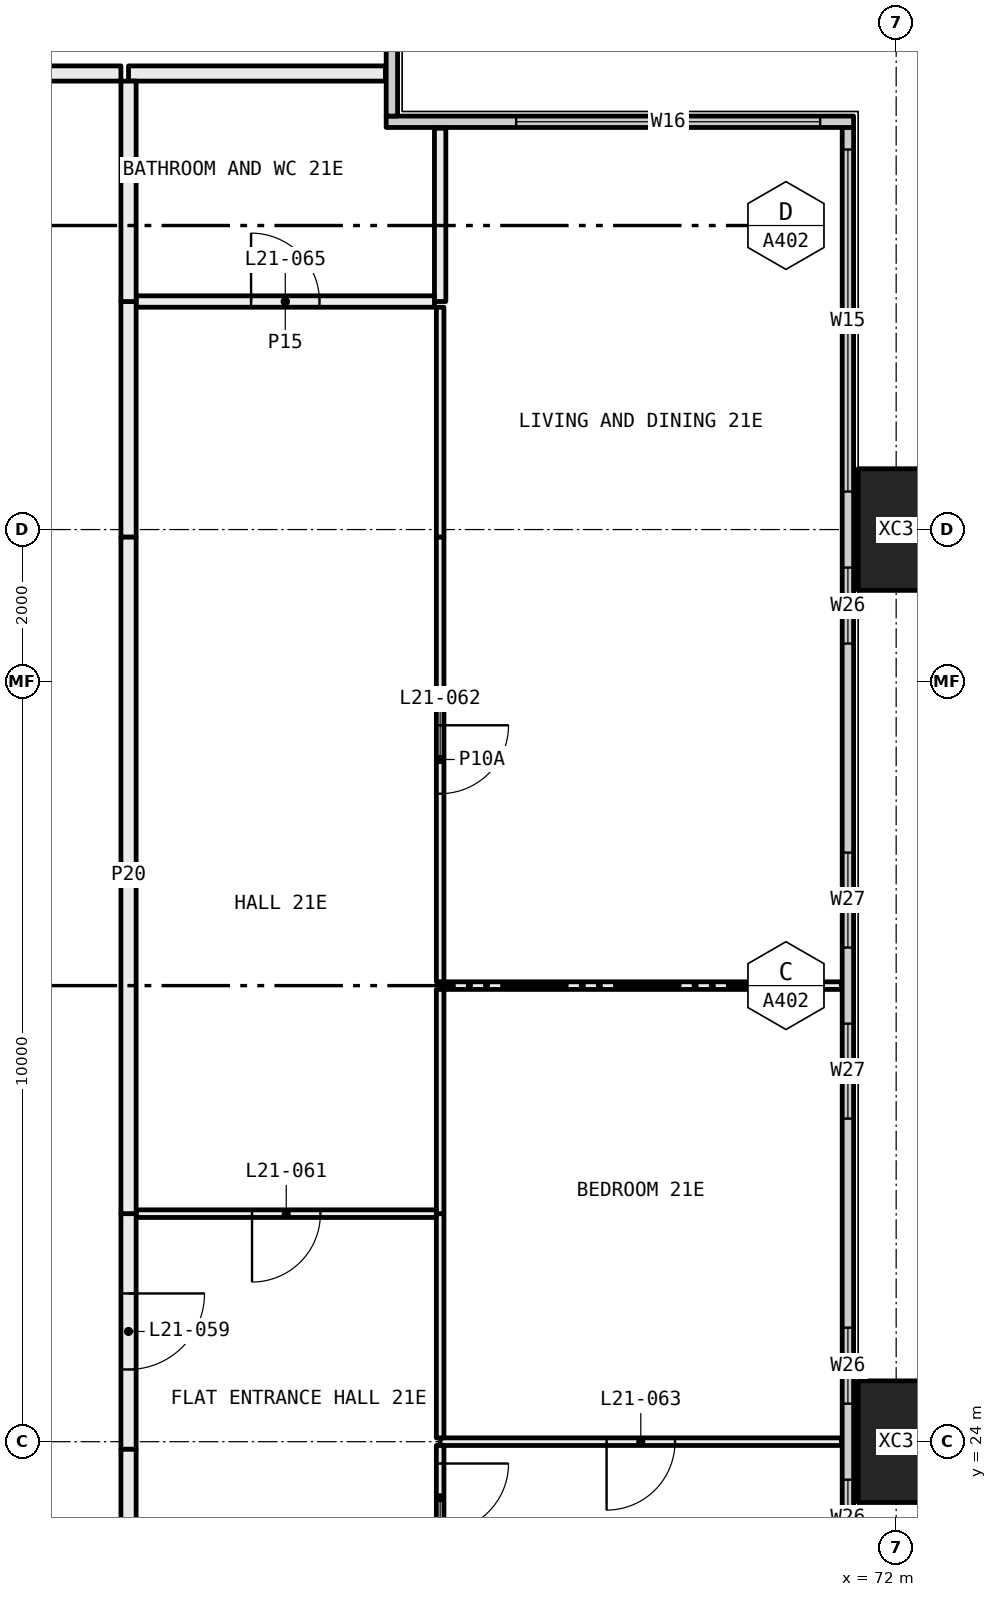
"""IFC4 building model, lengths in metres.
Left out: names, types, materials, properties, quantities, classifications, styles, units other than length and angle.
Written with IfcOpenShell. Run it as: python <this file> out.ifc"""

import sys

from ifc_helpers import new_model, si_unit, direction, frame, frame_2d, origin, origin_2d, place, context, subcontext, project, spatial, rectangle, hollow_rectangle, extrude, element, fill, save


model = new_model("IFC4")
c1 = context("Model", 3, precision=1e-05, world=origin(), true_north=direction((0.0, 1.0)))
c2 = subcontext(c1, "Body", "Model", "MODEL_VIEW")
j1 = project(units=[si_unit("LENGTHUNIT", "METRE"), si_unit("PLANEANGLEUNIT", "RADIAN")], contexts=[c1])
p1 = place(None, origin())
s1 = spatial("IfcSite", under=j1, at=p1, CompositionType="ELEMENT")
p2 = place(p1, origin())
s2 = spatial("IfcBuilding", under=s1, at=p2, CompositionType="ELEMENT")
p3 = place(p2, frame((0.0, 0.0, 85.2)))
s3 = spatial("IfcBuildingStorey", under=s2, at=p3, CompositionType="ELEMENT", Elevation=85.2)
for number, where, z_axis, x_axis in (
    (1, (72.0, 24.0, -0.4), (0.0, 0.0, 1.0), (0.0, 1.0, 0.0)),
    (2, (72.0, 36.0, -0.4), (0.0, 0.0, 1.0), (0.0, 1.0, 0.0)),
):
    element("IfcColumn", number, at=place(p3, frame(where, z_axis=z_axis, x_axis=x_axis)), inside=s3, PredefinedType="COLUMN", context=c2, shape_type="SweptSolid", body=[
        extrude(hollow_rectangle(XDim=1.6, YDim=1.0, WallThickness=0.065, at=origin_2d()), origin(), (0.0, 0.0, 1.0), 3.45),
    ])
p4 = place(p3, frame((71.365, 6.71, 0.0), z_axis=(0.0, 0.0, 1.0), x_axis=(0.0, 1.0, 0.0)))
e3 = element("IfcWall", 3, at=p4, inside=s3, PredefinedType="ELEMENTEDWALL", context=c2, shape_type="SweptSolid", body=[
    extrude(rectangle(XDim=34.58, YDim=0.15, at=frame_2d((17.29, 0.0))), origin(), (0.0, 0.0, 1.0), 3.05),
])
p5 = place(p4, frame((0.29, 0.0, 0.45)))
e4 = element("IfcOpeningElement", 4, at=p5, cuts=e3, PredefinedType="OPENING", context=c2, shape_type="SweptSolid", body=[
    extrude(rectangle(XDim=4.5, YDim=2.55, at=frame_2d((2.25, 1.275))), frame((0.0, 0.085, 0.0), z_axis=(0.0, -1.0, 0.0), x_axis=(1.0, 0.0, 0.0)), (0.0, 0.0, 1.0), 0.17),
])
p6 = place(p4, frame((5.79, 0.0, 0.45)))
e5 = element("IfcOpeningElement", 5, at=p6, cuts=e3, PredefinedType="OPENING", context=c2, shape_type="SweptSolid", body=[
    extrude(rectangle(XDim=1.0, YDim=2.55, at=frame_2d((0.5, 1.275))), frame((0.0, 0.085, 0.0), z_axis=(0.0, -1.0, 0.0), x_axis=(1.0, 0.0, 0.0)), (0.0, 0.0, 1.0), 0.17),
])
p7 = place(p4, frame((9.54, 0.0, 0.45)))
e6 = element("IfcOpeningElement", 6, at=p7, cuts=e3, PredefinedType="OPENING", context=c2, shape_type="SweptSolid", body=[
    extrude(rectangle(XDim=1.25, YDim=2.55, at=frame_2d((0.625, 1.275))), frame((0.0, 0.085, 0.0), z_axis=(0.0, -1.0, 0.0), x_axis=(1.0, 0.0, 0.0)), (0.0, 0.0, 1.0), 0.17),
])
p8 = place(p4, frame((11.79, 0.0, 0.45)))
e7 = element("IfcOpeningElement", 7, at=p8, cuts=e3, PredefinedType="OPENING", context=c2, shape_type="SweptSolid", body=[
    extrude(rectangle(XDim=1.25, YDim=2.55, at=frame_2d((0.625, 1.275))), frame((0.0, 0.085, 0.0), z_axis=(0.0, -1.0, 0.0), x_axis=(1.0, 0.0, 0.0)), (0.0, 0.0, 1.0), 0.17),
])
p9 = place(p4, frame((15.79, 0.0, 0.45)))
e8 = element("IfcOpeningElement", 8, at=p9, cuts=e3, PredefinedType="OPENING", context=c2, shape_type="SweptSolid", body=[
    extrude(rectangle(XDim=1.0, YDim=2.55, at=frame_2d((0.5, 1.275))), frame((0.0, 0.085, 0.0), z_axis=(0.0, -1.0, 0.0), x_axis=(1.0, 0.0, 0.0)), (0.0, 0.0, 1.0), 0.17),
])
p10 = place(p4, frame((17.79, 0.0, 0.45)))
e9 = element("IfcOpeningElement", 9, at=p10, cuts=e3, PredefinedType="OPENING", context=c2, shape_type="SweptSolid", body=[
    extrude(rectangle(XDim=1.0, YDim=2.55, at=frame_2d((0.5, 1.275))), frame((0.0, 0.085, 0.0), z_axis=(0.0, -1.0, 0.0), x_axis=(1.0, 0.0, 0.0)), (0.0, 0.0, 1.0), 0.17),
])
p11 = place(p4, frame((21.54, 0.0, 0.45)))
e10 = element("IfcOpeningElement", 10, at=p11, cuts=e3, PredefinedType="OPENING", context=c2, shape_type="SweptSolid", body=[
    extrude(rectangle(XDim=1.25, YDim=2.55, at=frame_2d((0.625, 1.275))), frame((0.0, 0.085, 0.0), z_axis=(0.0, -1.0, 0.0), x_axis=(1.0, 0.0, 0.0)), (0.0, 0.0, 1.0), 0.17),
])
p12 = place(p4, frame((23.79, 0.0, 0.45)))
e11 = element("IfcOpeningElement", 11, at=p12, cuts=e3, PredefinedType="OPENING", context=c2, shape_type="SweptSolid", body=[
    extrude(rectangle(XDim=1.25, YDim=2.55, at=frame_2d((0.625, 1.275))), frame((0.0, 0.085, 0.0), z_axis=(0.0, -1.0, 0.0), x_axis=(1.0, 0.0, 0.0)), (0.0, 0.0, 1.0), 0.17),
])
p13 = place(p4, frame((27.79, 0.0, 0.45)))
e12 = element("IfcOpeningElement", 12, at=p13, cuts=e3, PredefinedType="OPENING", context=c2, shape_type="SweptSolid", body=[
    extrude(rectangle(XDim=1.0, YDim=2.55, at=frame_2d((0.5, 1.275))), frame((0.0, 0.085, 0.0), z_axis=(0.0, -1.0, 0.0), x_axis=(1.0, 0.0, 0.0)), (0.0, 0.0, 1.0), 0.17),
])
p14 = place(p4, frame((29.79, 0.0, 0.45)))
e13 = element("IfcOpeningElement", 13, at=p14, cuts=e3, PredefinedType="OPENING", context=c2, shape_type="SweptSolid", body=[
    extrude(rectangle(XDim=4.5, YDim=2.55, at=frame_2d((2.25, 1.275))), frame((0.0, 0.085, 0.0), z_axis=(0.0, -1.0, 0.0), x_axis=(1.0, 0.0, 0.0)), (0.0, 0.0, 1.0), 0.17),
])
p15 = place(p3, frame((65.29, 41.365, 0.0), z_axis=(0.0, 0.0, 1.0), x_axis=(1.0, 0.0, 0.0)))
e14 = element("IfcWall", 14, at=p15, inside=s3, PredefinedType="ELEMENTEDWALL", context=c2, shape_type="SweptSolid", body=[
    extrude(rectangle(XDim=6.15, YDim=0.15, at=frame_2d((3.075, 0.0))), origin(), (0.0, 0.0, 1.0), 3.05),
])
p16 = place(p15, frame((1.71, 0.0, 0.45)))
e15 = element("IfcOpeningElement", 15, at=p16, cuts=e14, PredefinedType="OPENING", context=c2, shape_type="SweptSolid", body=[
    extrude(rectangle(XDim=4.0, YDim=2.55, at=frame_2d((2.0, 1.275))), frame((0.0, 0.085, 0.0), z_axis=(0.0, -1.0, 0.0), x_axis=(1.0, 0.0, 0.0)), (0.0, 0.0, 1.0), 0.17),
])
p17 = place(p3, frame((65.365, 41.44, 0.0), z_axis=(0.0, 0.0, 1.0), x_axis=(0.0, 1.0, 0.0)))
e16 = element("IfcWall", 16, at=p17, inside=s3, PredefinedType="ELEMENTEDWALL", context=c2, shape_type="SweptSolid", body=[
    extrude(rectangle(XDim=5.85, YDim=0.15, at=frame_2d((2.925, 0.0))), origin(), (0.0, 0.0, 1.0), 3.05),
])
p18 = place(p17, frame((1.56, 0.0, 0.45)))
e17 = element("IfcOpeningElement", 17, at=p18, cuts=e16, PredefinedType="OPENING", context=c2, shape_type="SweptSolid", body=[
    extrude(rectangle(XDim=4.0, YDim=2.55, at=frame_2d((2.0, 1.275))), frame((0.0, 0.085, 0.0), z_axis=(0.0, -1.0, 0.0), x_axis=(1.0, 0.0, 0.0)), (0.0, 0.0, 1.0), 0.17),
])
p19 = place(p3, frame((71.28, 24.0, 0.0), z_axis=(0.0, 0.0, 1.0), x_axis=(-1.0, 0.0, 0.0)))
e18 = element("IfcWall", 18, at=p19, inside=s3, PredefinedType="PARTITIONING", context=c2, shape_type="SweptSolid", body=[
    extrude(rectangle(XDim=5.28, YDim=0.1, at=frame_2d((2.64, 0.0))), origin(), (0.0, 0.0, 1.0), 2.45),
])
p20 = place(p19, frame((2.19, 0.0, 0.0)))
e19 = element("IfcOpeningElement", 19, at=p20, cuts=e18, PredefinedType="OPENING", context=c2, shape_type="SweptSolid", body=[
    extrude(rectangle(XDim=0.9, YDim=2.1, at=frame_2d((0.45, 1.05))), frame((0.0, 0.06, 0.0), z_axis=(0.0, -1.0, 0.0), x_axis=(1.0, 0.0, 0.0)), (0.0, 0.0, 1.0), 0.12),
])
p21 = place(p3, frame((66.0, 23.95, 0.0), z_axis=(0.0, 0.0, 1.0), x_axis=(0.0, -1.0, 0.0)))
e20 = element("IfcWall", 20, at=p21, inside=s3, PredefinedType="PARTITIONING", context=c2, shape_type="SweptSolid", body=[
    extrude(rectangle(XDim=1.375, YDim=0.1, at=frame_2d((0.688, 0.0))), origin(), (0.0, 0.0, 1.0), 2.45),
])
p22 = place(p21, frame((0.238, 0.0, 0.0)))
e21 = element("IfcOpeningElement", 21, at=p22, cuts=e20, PredefinedType="OPENING", context=c2, shape_type="SweptSolid", body=[
    extrude(rectangle(XDim=0.9, YDim=2.1, at=frame_2d((0.45, 1.05))), frame((0.0, 0.06, 0.0), z_axis=(0.0, -1.0, 0.0), x_axis=(1.0, 0.0, 0.0)), (0.0, 0.0, 1.0), 0.12),
])
p23 = place(p3, frame((71.28, 30.0, 0.0), z_axis=(0.0, 0.0, 1.0), x_axis=(-1.0, 0.0, 0.0)))
e22 = element("IfcWall", 22, at=p23, inside=s3, PredefinedType="PARTITIONING", context=c2, shape_type="SweptSolid", body=[
    extrude(rectangle(XDim=5.28, YDim=0.1, at=frame_2d((2.64, 0.0))), origin(), (0.0, 0.0, 1.0), 3.05),
])
p24 = place(p3, frame((66.0, 27.0, 0.0), z_axis=(0.0, 0.0, 1.0), x_axis=(0.0, -1.0, 0.0)))
e23 = element("IfcWall", 23, at=p24, inside=s3, PredefinedType="PARTITIONING", context=c2, shape_type="SweptSolid", body=[
    extrude(rectangle(XDim=2.95, YDim=0.1, at=frame_2d((1.475, 0.0))), origin(), (0.0, 0.0, 1.0), 2.45),
])
p25 = place(p3, frame((66.0, 29.95, 0.0), z_axis=(0.0, 0.0, 1.0), x_axis=(0.0, -1.0, 0.0)))
e24 = element("IfcWall", 24, at=p25, inside=s3, PredefinedType="PARTITIONING", context=c2, shape_type="SweptSolid", body=[
    extrude(rectangle(XDim=2.95, YDim=0.1, at=frame_2d((1.475, 0.0))), origin(), (0.0, 0.0, 1.0), 3.05),
])
p26 = place(p3, frame((66.0, 38.925, 0.0), z_axis=(0.0, 0.0, 1.0), x_axis=(0.0, -1.0, 0.0)))
e25 = element("IfcWall", 25, at=p26, inside=s3, PredefinedType="PARTITIONING", context=c2, shape_type="SweptSolid", body=[
    extrude(rectangle(XDim=3.025, YDim=0.1, at=frame_2d((1.513, 0.0))), origin(), (0.0, 0.0, 1.0), 2.45),
])
p27 = place(p3, frame((66.0, 35.9, 0.0), z_axis=(0.0, 0.0, 1.0), x_axis=(0.0, -1.0, 0.0)))
e26 = element("IfcWall", 26, at=p27, inside=s3, PredefinedType="PARTITIONING", context=c2, shape_type="SweptSolid", body=[
    extrude(rectangle(XDim=5.85, YDim=0.1, at=frame_2d((2.925, 0.0))), origin(), (0.0, 0.0, 1.0), 3.05),
])
p28 = place(p27, frame((2.475, 0.0, 0.0)))
e27 = element("IfcOpeningElement", 27, at=p28, cuts=e26, PredefinedType="OPENING", context=c2, shape_type="SweptSolid", body=[
    extrude(rectangle(XDim=0.9, YDim=2.1, at=frame_2d((0.45, 1.05))), frame((0.0, 0.06, 0.0), z_axis=(0.0, -1.0, 0.0), x_axis=(1.0, 0.0, 0.0)), (0.0, 0.0, 1.0), 0.12),
])
p29 = place(p3, frame((66.0, 41.28, 0.0), z_axis=(0.0, 0.0, 1.0), x_axis=(0.0, -1.0, 0.0)))
e28 = element("IfcWall", 28, at=p29, inside=s3, PredefinedType="PARTITIONING", context=c2, shape_type="SweptSolid", body=[
    extrude(rectangle(XDim=2.28, YDim=0.15, at=frame_2d((1.14, 0.0))), origin(), (0.0, 0.0, 1.0), 3.05),
])
p30 = place(p3, frame((65.95, 27.0, 0.0), z_axis=(0.0, 0.0, 1.0), x_axis=(-1.0, 0.0, 0.0)))
e29 = element("IfcWall", 29, at=p30, inside=s3, PredefinedType="PARTITIONING", context=c2, shape_type="SweptSolid", body=[
    extrude(rectangle(XDim=3.95, YDim=0.1, at=frame_2d((1.975, 0.0))), origin(), (0.0, 0.0, 1.0), 3.05),
])
p31 = place(p30, frame((1.525, 0.0, 0.0)))
e30 = element("IfcOpeningElement", 30, at=p31, cuts=e29, PredefinedType="OPENING", context=c2, shape_type="SweptSolid", body=[
    extrude(rectangle(XDim=0.9, YDim=2.1, at=frame_2d((0.45, 1.05))), frame((0.0, 0.06, 0.0), z_axis=(0.0, -1.0, 0.0), x_axis=(1.0, 0.0, 0.0)), (0.0, 0.0, 1.0), 0.12),
])
p32 = place(p3, frame((61.9, 27.0, 0.0), z_axis=(0.0, 0.0, 1.0), x_axis=(0.0, -1.0, 0.0)))
e31 = element("IfcWall", 31, at=p32, inside=s3, PredefinedType="PARTITIONING", context=c2, shape_type="SweptSolid", body=[
    extrude(rectangle(XDim=3.1, YDim=0.2, at=frame_2d((1.55, 0.0))), origin(), (0.0, 0.0, 1.0), 2.45),
])
p33 = place(p32, frame((1.05, 0.0, 0.0)))
e32 = element("IfcOpeningElement", 32, at=p33, cuts=e31, PredefinedType="OPENING", context=c2, shape_type="SweptSolid", body=[
    extrude(rectangle(XDim=1.0, YDim=2.1, at=frame_2d((0.5, 1.05))), frame((0.0, 0.11, 0.0), z_axis=(0.0, -1.0, 0.0), x_axis=(1.0, 0.0, 0.0)), (0.0, 0.0, 1.0), 0.22),
])
p34 = place(p3, frame((61.9, 23.9, 0.0), z_axis=(0.0, 0.0, 1.0), x_axis=(0.0, -1.0, 0.0)))
e33 = element("IfcWall", 33, at=p34, inside=s3, PredefinedType="PARTITIONING", context=c2, shape_type="SweptSolid", body=[
    extrude(rectangle(XDim=1.4, YDim=0.2, at=frame_2d((0.7, 0.0))), origin(), (0.0, 0.0, 1.0), 3.05),
])
p35 = place(p3, frame((65.925, 39.0, 0.0), z_axis=(0.0, 0.0, 1.0), x_axis=(-1.0, 0.0, 0.0)))
e34 = element("IfcWall", 34, at=p35, inside=s3, PredefinedType="PARTITIONING", context=c2, shape_type="SweptSolid", body=[
    extrude(rectangle(XDim=3.925, YDim=0.15, at=frame_2d((1.962, 0.0))), origin(), (0.0, 0.0, 1.0), 3.05),
])
p36 = place(p35, frame((1.512, 0.0, 0.0)))
e35 = element("IfcOpeningElement", 35, at=p36, cuts=e34, PredefinedType="OPENING", context=c2, shape_type="SweptSolid", body=[
    extrude(rectangle(XDim=0.9, YDim=2.1, at=frame_2d((0.45, 1.05))), frame((0.0, 0.085, 0.0), z_axis=(0.0, -1.0, 0.0), x_axis=(1.0, 0.0, 0.0)), (0.0, 0.0, 1.0), 0.17),
])
p37 = place(p3, frame((61.9, 39.0, 0.0), z_axis=(0.0, 0.0, 1.0), x_axis=(0.0, -1.0, 0.0)))
e36 = element("IfcWall", 36, at=p37, inside=s3, PredefinedType="PARTITIONING", context=c2, shape_type="SweptSolid", body=[
    extrude(rectangle(XDim=3.1, YDim=0.2, at=frame_2d((1.55, 0.0))), origin(), (0.0, 0.0, 1.0), 2.45),
])
p38 = place(p3, frame((61.9, 35.9, 0.0), z_axis=(0.0, 0.0, 1.0), x_axis=(0.0, -1.0, 0.0)))
e37 = element("IfcWall", 37, at=p38, inside=s3, PredefinedType="PARTITIONING", context=c2, shape_type="SweptSolid", body=[
    extrude(rectangle(XDim=8.9, YDim=0.2, at=frame_2d((4.45, 0.0))), origin(), (0.0, 0.0, 1.0), 3.05),
])
p39 = place(p3, frame((65.28, 42.0, 0.0), z_axis=(0.0, 0.0, 1.0), x_axis=(-1.0, 0.0, 0.0)))
e38 = element("IfcWall", 38, at=p39, inside=s3, PredefinedType="PARTITIONING", context=c2, shape_type="SweptSolid", body=[
    extrude(rectangle(XDim=3.38, YDim=0.2, at=frame_2d((1.69, 0.0))), origin(), (0.0, 0.0, 1.0), 3.05),
])
p40 = place(p3, frame((61.9, 41.9, 0.0), z_axis=(0.0, 0.0, 1.0), x_axis=(0.0, -1.0, 0.0)))
e39 = element("IfcWall", 39, at=p40, inside=s3, PredefinedType="PARTITIONING", context=c2, shape_type="SweptSolid", body=[
    extrude(rectangle(XDim=2.9, YDim=0.2, at=frame_2d((1.45, 0.0))), origin(), (0.0, 0.0, 1.0), 3.05),
])
p41 = place(p3, frame((60.0, 42.0, 0.0), z_axis=(0.0, 0.0, 1.0), x_axis=(1.0, 0.0, 0.0)))
e40 = element("IfcWall", 40, at=p41, inside=s3, PredefinedType="PARTITIONING", context=c2, shape_type="SweptSolid", body=[
    extrude(rectangle(XDim=1.8, YDim=0.2, at=frame_2d((0.9, 0.0))), origin(), (0.0, 0.0, 1.0), 3.05),
])
p42 = place(p9, origin())
e41 = element("IfcWindow", 41, at=p42, inside=s3, PartitioningType="SINGLE_PANEL", PredefinedType="WINDOW", context=c2, shape_type="SweptSolid", body=[
    extrude(rectangle(XDim=1.0, YDim=2.55, at=frame_2d((0.5, 1.275))), frame((0.0, 0.03, 0.0), z_axis=(0.0, -1.0, 0.0), x_axis=(1.0, 0.0, 0.0)), (0.0, 0.0, 1.0), 0.06),
])
fill(e8, e41)
p43 = place(p10, origin())
e42 = element("IfcWindow", 42, at=p43, inside=s3, PartitioningType="SINGLE_PANEL", PredefinedType="WINDOW", context=c2, shape_type="SweptSolid", body=[
    extrude(rectangle(XDim=1.0, YDim=2.55, at=frame_2d((0.5, 1.275))), frame((0.0, 0.03, 0.0), z_axis=(0.0, -1.0, 0.0), x_axis=(1.0, 0.0, 0.0)), (0.0, 0.0, 1.0), 0.06),
])
fill(e9, e42)
p44 = place(p11, origin())
e43 = element("IfcWindow", 43, at=p44, inside=s3, PartitioningType="SINGLE_PANEL", PredefinedType="WINDOW", context=c2, shape_type="SweptSolid", body=[
    extrude(rectangle(XDim=1.25, YDim=2.55, at=frame_2d((0.625, 1.275))), frame((0.0, 0.03, 0.0), z_axis=(0.0, -1.0, 0.0), x_axis=(1.0, 0.0, 0.0)), (0.0, 0.0, 1.0), 0.06),
])
fill(e10, e43)
p45 = place(p12, origin())
e44 = element("IfcWindow", 44, at=p45, inside=s3, PartitioningType="SINGLE_PANEL", PredefinedType="WINDOW", context=c2, shape_type="SweptSolid", body=[
    extrude(rectangle(XDim=1.25, YDim=2.55, at=frame_2d((0.625, 1.275))), frame((0.0, 0.03, 0.0), z_axis=(0.0, -1.0, 0.0), x_axis=(1.0, 0.0, 0.0)), (0.0, 0.0, 1.0), 0.06),
])
fill(e11, e44)
p46 = place(p13, origin())
e45 = element("IfcWindow", 45, at=p46, inside=s3, PartitioningType="SINGLE_PANEL", PredefinedType="WINDOW", context=c2, shape_type="SweptSolid", body=[
    extrude(rectangle(XDim=1.0, YDim=2.55, at=frame_2d((0.5, 1.275))), frame((0.0, 0.03, 0.0), z_axis=(0.0, -1.0, 0.0), x_axis=(1.0, 0.0, 0.0)), (0.0, 0.0, 1.0), 0.06),
])
fill(e12, e45)
p47 = place(p14, origin())
e46 = element("IfcWindow", 46, at=p47, inside=s3, PartitioningType="SINGLE_PANEL", PredefinedType="WINDOW", context=c2, shape_type="SweptSolid", body=[
    extrude(rectangle(XDim=4.5, YDim=2.55, at=frame_2d((2.25, 1.275))), frame((0.0, 0.03, 0.0), z_axis=(0.0, -1.0, 0.0), x_axis=(1.0, 0.0, 0.0)), (0.0, 0.0, 1.0), 0.06),
])
fill(e13, e46)
p48 = place(p16, origin())
e47 = element("IfcWindow", 47, at=p48, inside=s3, PartitioningType="SINGLE_PANEL", PredefinedType="WINDOW", context=c2, shape_type="SweptSolid", body=[
    extrude(rectangle(XDim=4.0, YDim=2.55, at=frame_2d((2.0, 1.275))), frame((0.0, 0.03, 0.0), z_axis=(0.0, -1.0, 0.0), x_axis=(1.0, 0.0, 0.0)), (0.0, 0.0, 1.0), 0.06),
])
fill(e15, e47)
p49 = place(p33, origin())
e48 = element("IfcDoor", 48, at=p49, inside=s3, OperationType="SINGLE_SWING_RIGHT", PredefinedType="DOOR", context=c2, shape_type="SweptSolid", body=[
    extrude(rectangle(XDim=1.0, YDim=2.1, at=frame_2d((0.5, 1.05))), frame((0.0, 0.025, 0.0), z_axis=(0.0, -1.0, 0.0), x_axis=(1.0, 0.0, 0.0)), (0.0, 0.0, 1.0), 0.05),
])
fill(e32, e48)
p50 = place(p22, origin())
e49 = element("IfcDoor", 49, at=p50, inside=s3, OperationType="SINGLE_SWING_RIGHT", PredefinedType="DOOR", context=c2, shape_type="SweptSolid", body=[
    extrude(rectangle(XDim=0.9, YDim=2.1, at=frame_2d((0.45, 1.05))), frame((0.0, 0.025, 0.0), z_axis=(0.0, -1.0, 0.0), x_axis=(1.0, 0.0, 0.0)), (0.0, 0.0, 1.0), 0.05),
])
fill(e21, e49)
p51 = place(p31, origin())
e50 = element("IfcDoor", 50, at=p51, inside=s3, OperationType="SINGLE_SWING_LEFT", PredefinedType="DOOR", context=c2, shape_type="SweptSolid", body=[
    extrude(rectangle(XDim=0.9, YDim=2.1, at=frame_2d((0.45, 1.05))), frame((0.0, 0.025, 0.0), z_axis=(0.0, -1.0, 0.0), x_axis=(1.0, 0.0, 0.0)), (0.0, 0.0, 1.0), 0.05),
])
fill(e30, e50)
p52 = place(p28, origin())
e51 = element("IfcDoor", 51, at=p52, inside=s3, OperationType="SINGLE_SWING_RIGHT", PredefinedType="DOOR", context=c2, shape_type="SweptSolid", body=[
    extrude(rectangle(XDim=0.9, YDim=2.1, at=frame_2d((0.45, 1.05))), frame((0.0, 0.025, 0.0), z_axis=(0.0, -1.0, 0.0), x_axis=(1.0, 0.0, 0.0)), (0.0, 0.0, 1.0), 0.05),
])
fill(e27, e51)
p53 = place(p20, origin())
e52 = element("IfcDoor", 52, at=p53, inside=s3, OperationType="SINGLE_SWING_LEFT", PredefinedType="DOOR", context=c2, shape_type="SweptSolid", body=[
    extrude(rectangle(XDim=0.9, YDim=2.1, at=frame_2d((0.45, 1.05))), frame((0.0, 0.025, 0.0), z_axis=(0.0, -1.0, 0.0), x_axis=(1.0, 0.0, 0.0)), (0.0, 0.0, 1.0), 0.05),
])
fill(e19, e52)
p54 = place(p36, frame((0.9, 0.0, 0.0), x_axis=(-1.0, 0.0, 0.0)))
e53 = element("IfcDoor", 53, at=p54, inside=s3, OperationType="SINGLE_SWING_RIGHT", PredefinedType="DOOR", context=c2, shape_type="SweptSolid", body=[
    extrude(rectangle(XDim=0.9, YDim=2.1, at=frame_2d((0.45, 1.05))), frame((0.0, 0.025, 0.0), z_axis=(0.0, -1.0, 0.0), x_axis=(1.0, 0.0, 0.0)), (0.0, 0.0, 1.0), 0.05),
])
fill(e35, e53)
save(model, sys.argv[1])
